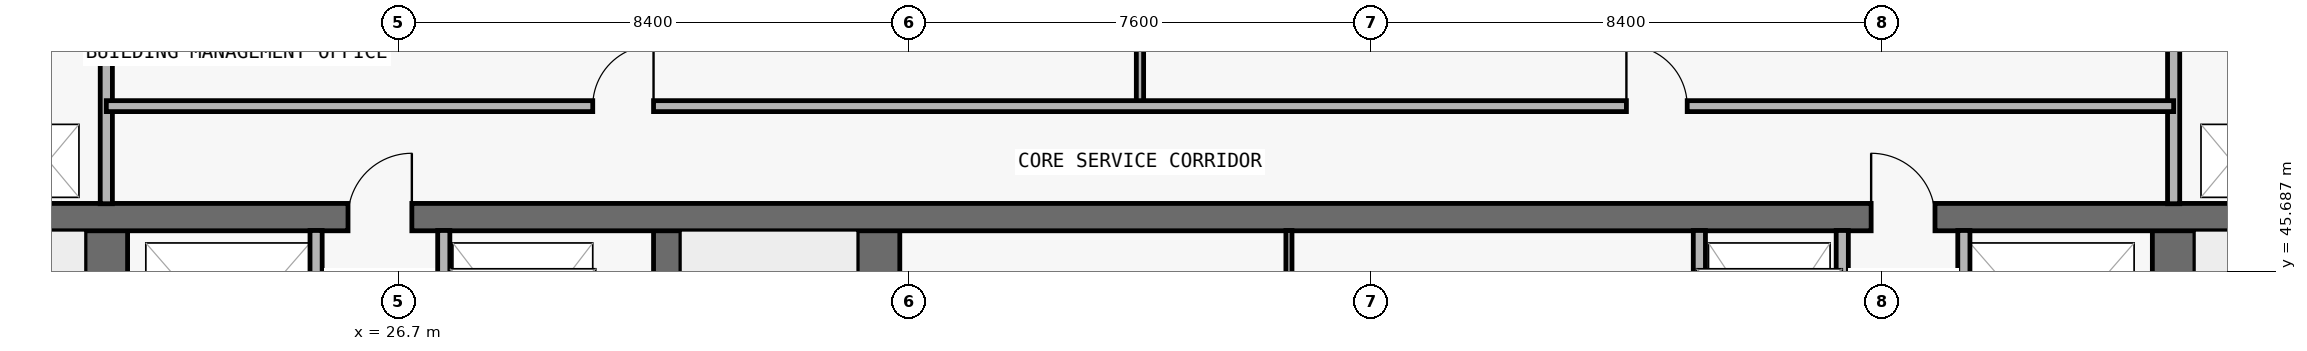
"""IFC4 building model, lengths in metres.
Left out: names, types, materials, properties, quantities, classifications, styles, units other than length and angle.
Written with IfcOpenShell. Run it as: python <this file> out.ifc"""

import sys

from ifc_helpers import new_model, si_unit, direction, frame, frame_2d, origin, place, context, subcontext, project, spatial, rectangle, extrude, element, fill, save


model = new_model("IFC4")
c1 = context("Model", 3, precision=1e-05, world=origin(), true_north=direction((0.0, 1.0)))
c2 = subcontext(c1, "Body", "Model", "MODEL_VIEW")
j1 = project(units=[si_unit("LENGTHUNIT", "METRE"), si_unit("PLANEANGLEUNIT", "RADIAN")], contexts=[c1])
p1 = place(None, origin())
s1 = spatial("IfcSite", under=j1, at=p1, CompositionType="ELEMENT")
p2 = place(p1, origin())
s2 = spatial("IfcBuilding", under=s1, at=p2, CompositionType="ELEMENT")
p3 = place(p2, frame((0.0, 0.0, 195.0)))
s3 = spatial("IfcBuildingStorey", under=s2, at=p3, CompositionType="ELEMENT", Elevation=195.0)
p4 = place(p3, frame((21.9, 37.0, 0.0), z_axis=(0.0, 0.0, 1.0), x_axis=(0.0, 1.0, 0.0)))
e1 = element("IfcWall", 1, at=p4, inside=s3, PredefinedType="SHEAR", context=c2, shape_type="SweptSolid", body=[
    extrude(rectangle(XDim=9.575, YDim=0.7, at=frame_2d((4.788, 0.0))), origin(), (0.0, 0.0, 1.0), 3.05),
])
p5 = place(p4, frame((0.55, 0.0, 0.0)))
e2 = element("IfcOpeningElement", 2, at=p5, cuts=e1, PredefinedType="OPENING", context=c2, shape_type="SweptSolid", body=[
    extrude(rectangle(XDim=1.1, YDim=2.15, at=frame_2d((0.55, 1.075))), frame((0.0, 0.36, 0.0), z_axis=(0.0, -1.0, 0.0), x_axis=(1.0, 0.0, 0.0)), (0.0, 0.0, 1.0), 0.72),
])
p6 = place(p3, frame((55.9, 37.0, 0.0), z_axis=(0.0, 0.0, 1.0), x_axis=(0.0, 1.0, 0.0)))
e3 = element("IfcWall", 3, at=p6, inside=s3, PredefinedType="SHEAR", context=c2, shape_type="SweptSolid", body=[
    extrude(rectangle(XDim=9.575, YDim=0.7, at=frame_2d((4.788, 0.0))), origin(), (0.0, 0.0, 1.0), 3.05),
])
p7 = place(p6, frame((0.55, 0.0, 0.0)))
e4 = element("IfcOpeningElement", 4, at=p7, cuts=e3, PredefinedType="OPENING", context=c2, shape_type="SweptSolid", body=[
    extrude(rectangle(XDim=1.1, YDim=2.15, at=frame_2d((0.55, 1.075))), frame((0.0, 0.36, 0.0), z_axis=(0.0, -1.0, 0.0), x_axis=(1.0, 0.0, 0.0)), (0.0, 0.0, 1.0), 0.72),
])
p8 = place(p3, frame((31.125, 37.0, 0.0), z_axis=(0.0, 0.0, 1.0), x_axis=(0.0, 1.0, 0.0)))
e5 = element("IfcWall", 5, at=p8, inside=s3, PredefinedType="SHEAR", context=c2, shape_type="SweptSolid", body=[
    extrude(rectangle(XDim=9.575, YDim=0.45, at=frame_2d((4.788, 0.0))), origin(), (0.0, 0.0, 1.0), 3.05),
])
p9 = place(p3, frame((34.6, 37.0, 0.0), z_axis=(0.0, 0.0, 1.0), x_axis=(0.0, 1.0, 0.0)))
e6 = element("IfcWall", 6, at=p9, inside=s3, PredefinedType="SHEAR", context=c2, shape_type="SweptSolid", body=[
    extrude(rectangle(XDim=9.575, YDim=0.7, at=frame_2d((4.788, 0.0))), origin(), (0.0, 0.0, 1.0), 3.05),
])
p10 = place(p3, frame((18.3, 46.575, 0.0), z_axis=(0.0, 0.0, 1.0), x_axis=(1.0, 0.0, 0.0)))
e7 = element("IfcWall", 7, at=p10, inside=s3, PredefinedType="SHEAR", context=c2, shape_type="SweptSolid", body=[
    extrude(rectangle(XDim=41.2, YDim=0.45, at=frame_2d((20.6, 0.0))), origin(), (0.0, 0.0, 1.0), 3.05),
])
p11 = place(p10, frame((7.575, 0.0, 0.0)))
e8 = element("IfcOpeningElement", 8, at=p11, cuts=e7, PredefinedType="OPENING", context=c2, shape_type="SweptSolid", body=[
    extrude(rectangle(XDim=1.05, YDim=2.15, at=frame_2d((0.525, 1.075))), frame((0.0, 0.235, 0.0), z_axis=(0.0, -1.0, 0.0), x_axis=(1.0, 0.0, 0.0)), (0.0, 0.0, 1.0), 0.47),
])
p12 = place(p10, frame((32.625, 0.0, 0.0)))
e9 = element("IfcOpeningElement", 9, at=p12, cuts=e7, PredefinedType="OPENING", context=c2, shape_type="SweptSolid", body=[
    extrude(rectangle(XDim=1.05, YDim=2.15, at=frame_2d((0.525, 1.075))), frame((0.0, 0.235, 0.0), z_axis=(0.0, -1.0, 0.0), x_axis=(1.0, 0.0, 0.0)), (0.0, 0.0, 1.0), 0.47),
])
p13 = place(p3, frame((21.9, 46.795, 0.0), z_axis=(0.0, 0.0, 1.0), x_axis=(0.0, 1.0, 0.0)))
e10 = element("IfcWall", 10, at=p13, inside=s3, PredefinedType="PARTITIONING", context=c2, shape_type="SweptSolid", body=[
    extrude(rectangle(XDim=3.16, YDim=0.2, at=frame_2d((1.58, 0.0))), origin(), (0.0, 0.0, 1.0), 3.05),
])
for number, where, z_axis, x_axis in (
    (11, (25.35, 43.17, 0.0), (0.0, 0.0, 1.0), (0.0, 1.0, 0.0)),
    (12, (27.45, 43.17, 0.0), (0.0, 0.0, 1.0), (0.0, 1.0, 0.0)),
):
    element("IfcWall", number, at=place(p3, frame(where, z_axis=z_axis, x_axis=x_axis)), inside=s3, PredefinedType="PARTITIONING", context=c2, shape_type="SweptSolid", body=[
        extrude(rectangle(XDim=3.185, YDim=0.2, at=frame_2d((1.593, 0.0))), origin(), (0.0, 0.0, 1.0), 3.05),
    ])
p14 = place(p3, frame((38.9, 48.4, 0.0), z_axis=(0.0, 0.0, 1.0), x_axis=(0.0, 1.0, 0.0)))
e13 = element("IfcWall", 13, at=p14, inside=s3, PredefinedType="PARTITIONING", context=c2, shape_type="SweptSolid", body=[
    extrude(rectangle(XDim=1.555, YDim=0.12, at=frame_2d((0.778, 0.0))), origin(), (0.0, 0.0, 1.0), 3.05),
])
p15 = place(p3, frame((41.35, 43.17, 0.0), z_axis=(0.0, 0.0, 1.0), x_axis=(0.0, 1.0, 0.0)))
e14 = element("IfcWall", 14, at=p15, inside=s3, PredefinedType="MOVABLE", context=c2, shape_type="SweptSolid", body=[
    extrude(rectangle(XDim=3.185, YDim=0.1, at=frame_2d((1.593, 0.0))), origin(), (0.0, 0.0, 1.0), 3.05),
])
for number, where, z_axis, x_axis in (
    (15, (48.1, 43.17, 0.0), (0.0, 0.0, 1.0), (0.0, 1.0, 0.0)),
    (16, (50.45, 43.17, 0.0), (0.0, 0.0, 1.0), (0.0, 1.0, 0.0)),
    (17, (52.45, 43.17, 0.0), (0.0, 0.0, 1.0), (0.0, 1.0, 0.0)),
):
    element("IfcWall", number, at=place(p3, frame(where, z_axis=z_axis, x_axis=x_axis)), inside=s3, PredefinedType="PARTITIONING", context=c2, shape_type="SweptSolid", body=[
        extrude(rectangle(XDim=3.185, YDim=0.2, at=frame_2d((1.593, 0.0))), origin(), (0.0, 0.0, 1.0), 3.05),
    ])
p16 = place(p3, frame((55.9, 46.795, 0.0), z_axis=(0.0, 0.0, 1.0), x_axis=(0.0, 1.0, 0.0)))
e18 = element("IfcWall", 18, at=p16, inside=s3, PredefinedType="PARTITIONING", context=c2, shape_type="SweptSolid", body=[
    extrude(rectangle(XDim=3.16, YDim=0.2, at=frame_2d((1.58, 0.0))), origin(), (0.0, 0.0, 1.0), 3.05),
])
p17 = place(p3, frame((21.9, 48.4, 0.0), z_axis=(0.0, 0.0, 1.0), x_axis=(1.0, 0.0, 0.0)))
e19 = element("IfcWall", 19, at=p17, inside=s3, PredefinedType="PARTITIONING", context=c2, shape_type="SweptSolid", body=[
    extrude(rectangle(XDim=34.0, YDim=0.18, at=frame_2d((17.0, 0.0))), origin(), (0.0, 0.0, 1.0), 3.05),
])
p18 = place(p17, frame((8.0, 0.0, 0.0)))
e20 = element("IfcOpeningElement", 20, at=p18, cuts=e19, PredefinedType="OPENING", context=c2, shape_type="SweptSolid", body=[
    extrude(rectangle(XDim=1.0, YDim=2.2, at=frame_2d((0.5, 1.1))), frame((0.0, 0.1, 0.0), z_axis=(0.0, -1.0, 0.0), x_axis=(1.0, 0.0, 0.0)), (0.0, 0.0, 1.0), 0.2),
])
p19 = place(p17, frame((25.0, 0.0, 0.0)))
e21 = element("IfcOpeningElement", 21, at=p19, cuts=e19, PredefinedType="OPENING", context=c2, shape_type="SweptSolid", body=[
    extrude(rectangle(XDim=1.0, YDim=2.2, at=frame_2d((0.5, 1.1))), frame((0.0, 0.1, 0.0), z_axis=(0.0, -1.0, 0.0), x_axis=(1.0, 0.0, 0.0)), (0.0, 0.0, 1.0), 0.2),
])
p20 = place(p11, origin())
e22 = element("IfcDoor", 22, at=p20, inside=s3, OperationType="SINGLE_SWING_RIGHT", PredefinedType="DOOR", context=c2, shape_type="SweptSolid", body=[
    extrude(rectangle(XDim=1.05, YDim=2.15, at=frame_2d((0.525, 1.075))), frame((0.0, 0.025, 0.0), z_axis=(0.0, -1.0, 0.0), x_axis=(1.0, 0.0, 0.0)), (0.0, 0.0, 1.0), 0.05),
])
fill(e8, e22)
p21 = place(p12, origin())
e23 = element("IfcDoor", 23, at=p21, inside=s3, OperationType="SINGLE_SWING_LEFT", PredefinedType="DOOR", context=c2, shape_type="SweptSolid", body=[
    extrude(rectangle(XDim=1.05, YDim=2.15, at=frame_2d((0.525, 1.075))), frame((0.0, 0.025, 0.0), z_axis=(0.0, -1.0, 0.0), x_axis=(1.0, 0.0, 0.0)), (0.0, 0.0, 1.0), 0.05),
])
fill(e9, e23)
p22 = place(p18, origin())
e24 = element("IfcDoor", 24, at=p22, inside=s3, OperationType="SINGLE_SWING_RIGHT", PredefinedType="DOOR", context=c2, shape_type="SweptSolid", body=[
    extrude(rectangle(XDim=1.0, YDim=2.2, at=frame_2d((0.5, 1.1))), frame((0.0, 0.025, 0.0), z_axis=(0.0, -1.0, 0.0), x_axis=(1.0, 0.0, 0.0)), (0.0, 0.0, 1.0), 0.05),
])
fill(e20, e24)
p23 = place(p19, origin())
e25 = element("IfcDoor", 25, at=p23, inside=s3, OperationType="SINGLE_SWING_LEFT", PredefinedType="DOOR", context=c2, shape_type="SweptSolid", body=[
    extrude(rectangle(XDim=1.0, YDim=2.2, at=frame_2d((0.5, 1.1))), frame((0.0, 0.025, 0.0), z_axis=(0.0, -1.0, 0.0), x_axis=(1.0, 0.0, 0.0)), (0.0, 0.0, 1.0), 0.05),
])
fill(e21, e25)
save(model, sys.argv[1])
